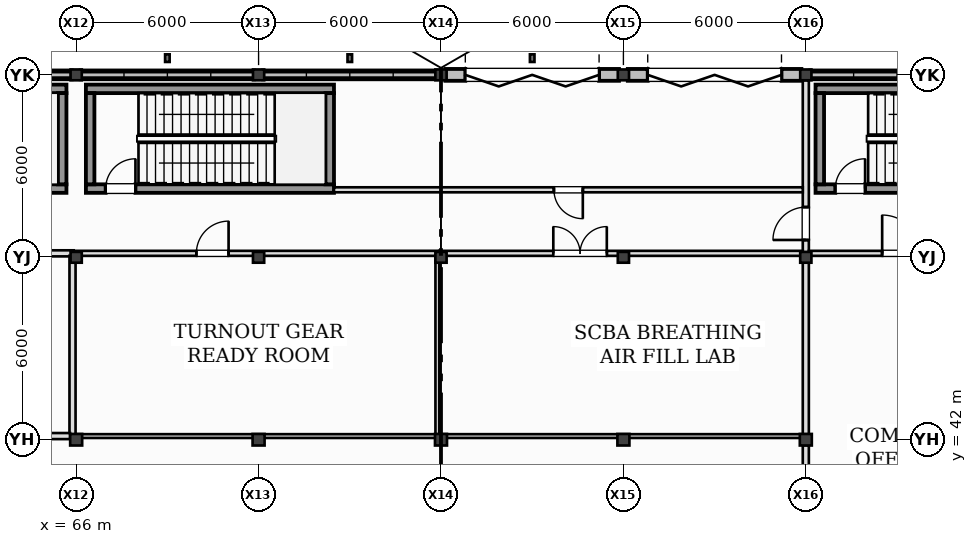
"""IFC4 building model, lengths in metres.
Left out: names, types, materials, properties, quantities, classifications, styles, units other than length and angle.
Written with IfcOpenShell. Run it as: python <this file> out.ifc"""

import sys

from ifc_helpers import new_model, si_unit, direction, frame, frame_2d, origin, origin_2d, place, context, subcontext, project, spatial, rectangle, hollow_rectangle, i_section, extrude, element, fill, save


model = new_model("IFC4")
c1 = context("Model", 3, precision=1e-05, world=origin(), true_north=direction((0.0, 1.0)))
c2 = subcontext(c1, "Body", "Model", "MODEL_VIEW")
j1 = project(units=[si_unit("LENGTHUNIT", "METRE"), si_unit("PLANEANGLEUNIT", "RADIAN")], contexts=[c1])
p1 = place(None, origin())
s1 = spatial("IfcSite", under=j1, at=p1, CompositionType="ELEMENT")
p2 = place(p1, origin())
s2 = spatial("IfcBuilding", under=s1, at=p2, CompositionType="ELEMENT")
p3 = place(p2, origin())
s3 = spatial("IfcBuildingStorey", under=s2, at=p3, CompositionType="ELEMENT", Elevation=0.0)
p4 = place(p3, frame((66.0, 42.0, -0.41), z_axis=(0.0, 0.0, 1.0), x_axis=(1.0, 0.0, 0.0)))
e1 = element("IfcColumn", 1, at=p4, inside=s3, PredefinedType="COLUMN", context=c2, shape_type="SweptSolid", body=[
    extrude(i_section(OverallWidth=0.395, OverallDepth=0.38, WebThickness=0.019, FlangeThickness=0.03, at=origin_2d()), origin(), (0.0, 0.0, 1.0), 6.41),
])
for number, where, z_axis, x_axis in (
    (2, (66.0, 48.0, -0.41), (0.0, 0.0, 1.0), (1.0, 0.0, 0.0)),
    (3, (66.0, 54.0, -0.41), (0.0, 0.0, 1.0), (1.0, 0.0, 0.0)),
):
    element("IfcColumn", number, at=place(p3, frame(where, z_axis=z_axis, x_axis=x_axis)), inside=s3, PredefinedType="COLUMN", context=c2, shape_type="SweptSolid", body=[
        extrude(i_section(OverallWidth=0.369, OverallDepth=0.356, WebThickness=0.011, FlangeThickness=0.018, at=origin_2d()), origin(), (0.0, 0.0, 1.0), 6.41),
    ])
p5 = place(p3, frame((72.0, 42.0, -0.41), z_axis=(0.0, 0.0, 1.0), x_axis=(1.0, 0.0, 0.0)))
e4 = element("IfcColumn", 4, at=p5, inside=s3, PredefinedType="COLUMN", context=c2, shape_type="SweptSolid", body=[
    extrude(i_section(OverallWidth=0.395, OverallDepth=0.38, WebThickness=0.019, FlangeThickness=0.03, at=origin_2d()), origin(), (0.0, 0.0, 1.0), 6.41),
])
for number, where, z_axis, x_axis in (
    (5, (72.0, 48.0, -0.41), (0.0, 0.0, 1.0), (1.0, 0.0, 0.0)),
    (6, (72.0, 54.0, -0.41), (0.0, 0.0, 1.0), (1.0, 0.0, 0.0)),
):
    element("IfcColumn", number, at=place(p3, frame(where, z_axis=z_axis, x_axis=x_axis)), inside=s3, PredefinedType="COLUMN", context=c2, shape_type="SweptSolid", body=[
        extrude(i_section(OverallWidth=0.369, OverallDepth=0.356, WebThickness=0.011, FlangeThickness=0.018, at=origin_2d()), origin(), (0.0, 0.0, 1.0), 6.41),
    ])
p6 = place(p3, frame((78.0, 42.0, -0.41), z_axis=(0.0, 0.0, 1.0), x_axis=(1.0, 0.0, 0.0)))
e7 = element("IfcColumn", 7, at=p6, inside=s3, PredefinedType="COLUMN", context=c2, shape_type="SweptSolid", body=[
    extrude(i_section(OverallWidth=0.395, OverallDepth=0.38, WebThickness=0.019, FlangeThickness=0.03, at=origin_2d()), origin(), (0.0, 0.0, 1.0), 6.41),
])
for number, where, z_axis, x_axis in (
    (8, (78.0, 48.0, -0.41), (0.0, 0.0, 1.0), (1.0, 0.0, 0.0)),
    (9, (78.0, 54.0, -0.41), (0.0, 0.0, 1.0), (1.0, 0.0, 0.0)),
):
    element("IfcColumn", number, at=place(p3, frame(where, z_axis=z_axis, x_axis=x_axis)), inside=s3, PredefinedType="COLUMN", context=c2, shape_type="SweptSolid", body=[
        extrude(i_section(OverallWidth=0.369, OverallDepth=0.356, WebThickness=0.011, FlangeThickness=0.018, at=origin_2d()), origin(), (0.0, 0.0, 1.0), 6.41),
    ])
p7 = place(p3, frame((84.0, 42.0, -0.41), z_axis=(0.0, 0.0, 1.0), x_axis=(1.0, 0.0, 0.0)))
e10 = element("IfcColumn", 10, at=p7, inside=s3, PredefinedType="COLUMN", context=c2, shape_type="SweptSolid", body=[
    extrude(i_section(OverallWidth=0.395, OverallDepth=0.38, WebThickness=0.019, FlangeThickness=0.03, at=origin_2d()), origin(), (0.0, 0.0, 1.0), 6.41),
])
for number, where, z_axis, x_axis in (
    (11, (84.0, 48.0, -0.41), (0.0, 0.0, 1.0), (1.0, 0.0, 0.0)),
    (12, (84.0, 54.0, -0.41), (0.0, 0.0, 1.0), (1.0, 0.0, 0.0)),
):
    element("IfcColumn", number, at=place(p3, frame(where, z_axis=z_axis, x_axis=x_axis)), inside=s3, PredefinedType="COLUMN", context=c2, shape_type="SweptSolid", body=[
        extrude(i_section(OverallWidth=0.369, OverallDepth=0.356, WebThickness=0.011, FlangeThickness=0.018, at=origin_2d()), origin(), (0.0, 0.0, 1.0), 6.41),
    ])
p8 = place(p3, frame((90.0, 42.0, -0.41), z_axis=(0.0, 0.0, 1.0), x_axis=(1.0, 0.0, 0.0)))
e13 = element("IfcColumn", 13, at=p8, inside=s3, PredefinedType="COLUMN", context=c2, shape_type="SweptSolid", body=[
    extrude(i_section(OverallWidth=0.395, OverallDepth=0.38, WebThickness=0.019, FlangeThickness=0.03, at=origin_2d()), origin(), (0.0, 0.0, 1.0), 6.41),
])
for number, where, z_axis, x_axis in (
    (14, (90.0, 48.0, -0.41), (0.0, 0.0, 1.0), (1.0, 0.0, 0.0)),
    (15, (90.0, 54.0, -0.41), (0.0, 0.0, 1.0), (1.0, 0.0, 0.0)),
):
    element("IfcColumn", number, at=place(p3, frame(where, z_axis=z_axis, x_axis=x_axis)), inside=s3, PredefinedType="COLUMN", context=c2, shape_type="SweptSolid", body=[
        extrude(i_section(OverallWidth=0.369, OverallDepth=0.356, WebThickness=0.011, FlangeThickness=0.018, at=origin_2d()), origin(), (0.0, 0.0, 1.0), 6.41),
    ])
for number, where, z_axis, x_axis in (
    (16, (69.0, 54.55, -0.35), (0.0, 0.0, 1.0), (1.0, 0.0, 0.0)),
    (17, (75.0, 54.55, -0.35), (0.0, 0.0, 1.0), (1.0, 0.0, 0.0)),
    (18, (81.0, 54.55, -0.35), (0.0, 0.0, 1.0), (1.0, 0.0, 0.0)),
):
    element("IfcColumn", number, at=place(p3, frame(where, z_axis=z_axis, x_axis=x_axis)), inside=s3, PredefinedType="PILASTER", context=c2, shape_type="SweptSolid", body=[
        extrude(hollow_rectangle(XDim=0.15, YDim=0.25, WallThickness=0.008, at=origin_2d()), origin(), (0.0, 0.0, 1.0), 6.35),
    ])
p9 = place(p3, frame((65.855, 54.0, 0.0), z_axis=(0.0, 0.0, 1.0), x_axis=(-1.0, 0.0, 0.0)))
e19 = element("IfcWall", 19, at=p9, inside=s3, PredefinedType="STANDARD", context=c2, shape_type="SweptSolid", body=[
    extrude(rectangle(XDim=5.71, YDim=0.29, at=frame_2d((2.855, 0.0))), origin(), (0.0, 0.0, 1.0), 0.92),
])
p10 = place(p3, frame((71.855, 54.0, 0.0), z_axis=(0.0, 0.0, 1.0), x_axis=(-1.0, 0.0, 0.0)))
e20 = element("IfcWall", 20, at=p10, inside=s3, PredefinedType="STANDARD", context=c2, shape_type="SweptSolid", body=[
    extrude(rectangle(XDim=5.71, YDim=0.29, at=frame_2d((2.855, 0.0))), origin(), (0.0, 0.0, 1.0), 0.32),
])
p11 = place(p3, frame((77.855, 54.0, 0.0), z_axis=(0.0, 0.0, 1.0), x_axis=(-1.0, 0.0, 0.0)))
e21 = element("IfcWall", 21, at=p11, inside=s3, PredefinedType="STANDARD", context=c2, shape_type="SweptSolid", body=[
    extrude(rectangle(XDim=5.71, YDim=0.29, at=frame_2d((2.855, 0.0))), origin(), (0.0, 0.0, 1.0), 0.44),
])
p12 = place(p3, frame((83.855, 54.0, 0.0), z_axis=(0.0, 0.0, 1.0), x_axis=(-1.0, 0.0, 0.0)))
e22 = element("IfcWall", 22, at=p12, inside=s3, PredefinedType="STANDARD", context=c2, shape_type="SweptSolid", body=[
    extrude(rectangle(XDim=5.71, YDim=0.39, at=frame_2d((2.855, 0.0))), origin(), (0.0, 0.0, 1.0), 5.035),
])
p13 = place(p12, frame((0.655, 0.0, 0.0)))
e23 = element("IfcOpeningElement", 23, at=p13, cuts=e22, PredefinedType="OPENING", context=c2, shape_type="SweptSolid", body=[
    extrude(rectangle(XDim=4.4, YDim=4.55, at=frame_2d((2.2, 2.275))), frame((0.0, 0.205, 0.0), z_axis=(0.0, -1.0, 0.0), x_axis=(1.0, 0.0, 0.0)), (0.0, 0.0, 1.0), 0.41),
])
p14 = place(p3, frame((89.855, 54.0, 0.0), z_axis=(0.0, 0.0, 1.0), x_axis=(-1.0, 0.0, 0.0)))
e24 = element("IfcWall", 24, at=p14, inside=s3, PredefinedType="STANDARD", context=c2, shape_type="SweptSolid", body=[
    extrude(rectangle(XDim=5.71, YDim=0.39, at=frame_2d((2.855, 0.0))), origin(), (0.0, 0.0, 1.0), 5.035),
])
p15 = place(p14, frame((0.655, 0.0, 0.0)))
e25 = element("IfcOpeningElement", 25, at=p15, cuts=e24, PredefinedType="OPENING", context=c2, shape_type="SweptSolid", body=[
    extrude(rectangle(XDim=4.4, YDim=4.55, at=frame_2d((2.2, 2.275))), frame((0.0, 0.205, 0.0), z_axis=(0.0, -1.0, 0.0), x_axis=(1.0, 0.0, 0.0)), (0.0, 0.0, 1.0), 0.41),
])
p16 = place(p3, frame((95.855, 54.0, 0.0), z_axis=(0.0, 0.0, 1.0), x_axis=(-1.0, 0.0, 0.0)))
e26 = element("IfcWall", 26, at=p16, inside=s3, PredefinedType="STANDARD", context=c2, shape_type="SweptSolid", body=[
    extrude(rectangle(XDim=5.71, YDim=0.29, at=frame_2d((2.855, 0.0))), origin(), (0.0, 0.0, 1.0), 0.92),
])
p17 = place(p3, frame((57.52, 50.26, 0.0), z_axis=(0.0, 0.0, 1.0), x_axis=(1.0, 0.0, 0.0)))
e27 = element("IfcWall", 27, at=p17, inside=s3, PredefinedType="SHEAR", context=c2, shape_type="SweptSolid", body=[
    extrude(rectangle(XDim=8.16, YDim=0.28, at=frame_2d((4.08, 0.0))), origin(), (0.0, 0.0, 1.0), 6.0),
])
p18 = place(p17, frame((0.65, 0.0, 0.0)))
e28 = element("IfcOpeningElement", 28, at=p18, cuts=e27, PredefinedType="OPENING", context=c2, shape_type="SweptSolid", body=[
    extrude(rectangle(XDim=0.98, YDim=2.15, at=frame_2d((0.49, 1.075))), frame((0.0, 0.15, 0.0), z_axis=(0.0, -1.0, 0.0), x_axis=(1.0, 0.0, 0.0)), (0.0, 0.0, 1.0), 0.3),
])
p19 = place(p3, frame((65.68, 53.54, 0.0), z_axis=(0.0, 0.0, 1.0), x_axis=(-1.0, 0.0, 0.0)))
e29 = element("IfcWall", 29, at=p19, inside=s3, PredefinedType="SHEAR", context=c2, shape_type="SweptSolid", body=[
    extrude(rectangle(XDim=8.16, YDim=0.28, at=frame_2d((4.08, 0.0))), origin(), (0.0, 0.0, 1.0), 6.0),
])
p20 = place(p3, frame((65.54, 50.4, 0.0), z_axis=(0.0, 0.0, 1.0), x_axis=(0.0, 1.0, 0.0)))
e30 = element("IfcWall", 30, at=p20, inside=s3, PredefinedType="SHEAR", context=c2, shape_type="SweptSolid", body=[
    extrude(rectangle(XDim=3.0, YDim=0.28, at=frame_2d((1.5, 0.0))), origin(), (0.0, 0.0, 1.0), 6.0),
])
p21 = place(p3, frame((90.32, 50.26, 0.0), z_axis=(0.0, 0.0, 1.0), x_axis=(1.0, 0.0, 0.0)))
e31 = element("IfcWall", 31, at=p21, inside=s3, PredefinedType="SHEAR", context=c2, shape_type="SweptSolid", body=[
    extrude(rectangle(XDim=8.16, YDim=0.28, at=frame_2d((4.08, 0.0))), origin(), (0.0, 0.0, 1.0), 6.0),
])
p22 = place(p21, frame((0.65, 0.0, 0.0)))
e32 = element("IfcOpeningElement", 32, at=p22, cuts=e31, PredefinedType="OPENING", context=c2, shape_type="SweptSolid", body=[
    extrude(rectangle(XDim=0.98, YDim=2.15, at=frame_2d((0.49, 1.075))), frame((0.0, 0.15, 0.0), z_axis=(0.0, -1.0, 0.0), x_axis=(1.0, 0.0, 0.0)), (0.0, 0.0, 1.0), 0.3),
])
p23 = place(p3, frame((98.48, 53.54, 0.0), z_axis=(0.0, 0.0, 1.0), x_axis=(-1.0, 0.0, 0.0)))
e33 = element("IfcWall", 33, at=p23, inside=s3, PredefinedType="SHEAR", context=c2, shape_type="SweptSolid", body=[
    extrude(rectangle(XDim=8.16, YDim=0.28, at=frame_2d((4.08, 0.0))), origin(), (0.0, 0.0, 1.0), 6.0),
])
p24 = place(p3, frame((90.46, 53.4, 0.0), z_axis=(0.0, 0.0, 1.0), x_axis=(0.0, -1.0, 0.0)))
e34 = element("IfcWall", 34, at=p24, inside=s3, PredefinedType="SHEAR", context=c2, shape_type="SweptSolid", body=[
    extrude(rectangle(XDim=3.0, YDim=0.28, at=frame_2d((1.5, 0.0))), origin(), (0.0, 0.0, 1.0), 6.0),
])
p25 = place(p3, frame((66.32, 50.26, 0.0), z_axis=(0.0, 0.0, 1.0), x_axis=(1.0, 0.0, 0.0)))
e35 = element("IfcWall", 35, at=p25, inside=s3, PredefinedType="SHEAR", context=c2, shape_type="SweptSolid", body=[
    extrude(rectangle(XDim=8.16, YDim=0.28, at=frame_2d((4.08, 0.0))), origin(), (0.0, 0.0, 1.0), 6.0),
])
p26 = place(p25, frame((0.65, 0.0, 0.0)))
e36 = element("IfcOpeningElement", 36, at=p26, cuts=e35, PredefinedType="OPENING", context=c2, shape_type="SweptSolid", body=[
    extrude(rectangle(XDim=0.98, YDim=2.15, at=frame_2d((0.49, 1.075))), frame((0.0, 0.15, 0.0), z_axis=(0.0, -1.0, 0.0), x_axis=(1.0, 0.0, 0.0)), (0.0, 0.0, 1.0), 0.3),
])
p27 = place(p3, frame((74.48, 53.54, 0.0), z_axis=(0.0, 0.0, 1.0), x_axis=(-1.0, 0.0, 0.0)))
e37 = element("IfcWall", 37, at=p27, inside=s3, PredefinedType="SHEAR", context=c2, shape_type="SweptSolid", body=[
    extrude(rectangle(XDim=8.16, YDim=0.28, at=frame_2d((4.08, 0.0))), origin(), (0.0, 0.0, 1.0), 6.0),
])
for number, where, z_axis, x_axis in (
    (38, (66.46, 53.4, 0.0), (0.0, 0.0, 1.0), (0.0, -1.0, 0.0)),
    (39, (74.34, 50.4, 0.0), (0.0, 0.0, 1.0), (0.0, 1.0, 0.0)),
):
    element("IfcWall", number, at=place(p3, frame(where, z_axis=z_axis, x_axis=x_axis)), inside=s3, PredefinedType="SHEAR", context=c2, shape_type="SweptSolid", body=[
        extrude(rectangle(XDim=3.0, YDim=0.28, at=frame_2d((1.5, 0.0))), origin(), (0.0, 0.0, 1.0), 6.0),
    ])
p28 = place(p3, frame((90.0, 36.18, 0.0), z_axis=(0.0, 0.0, 1.0), x_axis=(0.0, 1.0, 0.0)))
e40 = element("IfcWall", 40, at=p28, inside=s3, PredefinedType="PARTITIONING", context=c2, shape_type="SweptSolid", body=[
    extrude(rectangle(XDim=5.64, YDim=0.2, at=frame_2d((2.82, 0.0))), origin(), (0.0, 0.0, 1.0), 4.959),
])
p29 = place(p3, frame((90.0, 42.18, 0.0), z_axis=(0.0, 0.0, 1.0), x_axis=(0.0, 1.0, 0.0)))
e41 = element("IfcWall", 41, at=p29, inside=s3, PredefinedType="PARTITIONING", context=c2, shape_type="SweptSolid", body=[
    extrude(rectangle(XDim=5.72, YDim=0.2, at=frame_2d((2.86, 0.0))), origin(), (0.0, 0.0, 1.0), 5.044),
])
p30 = place(p3, frame((90.0, 48.05, 0.0), z_axis=(0.0, 0.0, 1.0), x_axis=(0.0, 1.0, 0.0)))
e42 = element("IfcWall", 42, at=p30, inside=s3, PredefinedType="PARTITIONING", context=c2, shape_type="SweptSolid", body=[
    extrude(rectangle(XDim=5.77, YDim=0.2, at=frame_2d((2.885, 0.0))), origin(), (0.0, 0.0, 1.0), 5.044),
])
p31 = place(p30, frame((0.52, 0.0, 0.0)))
e43 = element("IfcOpeningElement", 43, at=p31, cuts=e42, PredefinedType="OPENING", context=c2, shape_type="SweptSolid", body=[
    extrude(rectangle(XDim=1.08, YDim=2.14, at=frame_2d((0.54, 1.07))), frame((0.0, 0.11, 0.0), z_axis=(0.0, -1.0, 0.0), x_axis=(1.0, 0.0, 0.0)), (0.0, 0.0, 1.0), 0.22),
])
p32 = place(p3, frame((53.98, 48.13, 0.0), z_axis=(0.0, 0.0, 1.0), x_axis=(1.0, 0.0, 0.0)))
e44 = element("IfcWall", 44, at=p32, inside=s3, PredefinedType="PARTITIONING", context=c2, shape_type="SweptSolid", body=[
    extrude(rectangle(XDim=11.94, YDim=0.2, at=frame_2d((5.97, 0.0))), origin(), (0.0, 0.0, 1.0), 5.035),
])
p33 = place(p32, frame((3.915, 0.0, 0.0)))
e45 = element("IfcOpeningElement", 45, at=p33, cuts=e44, PredefinedType="OPENING", context=c2, shape_type="SweptSolid", body=[
    extrude(rectangle(XDim=1.46, YDim=2.3, at=frame_2d((0.73, 1.15))), frame((0.0, 0.11, 0.0), z_axis=(0.0, -1.0, 0.0), x_axis=(1.0, 0.0, 0.0)), (0.0, 0.0, 1.0), 0.22),
])
p34 = place(p3, frame((65.88, 48.05, 0.0), z_axis=(0.0, 0.0, 1.0), x_axis=(0.0, -1.0, 0.0)))
e46 = element("IfcWall", 46, at=p34, inside=s3, PredefinedType="PARTITIONING", context=c2, shape_type="SweptSolid", body=[
    extrude(rectangle(XDim=5.97, YDim=0.2, at=frame_2d((2.985, 0.0))), origin(), (0.0, 0.0, 1.0), 5.044),
])
p35 = place(p3, frame((65.8, 42.12, 0.0), z_axis=(0.0, 0.0, 1.0), x_axis=(-1.0, 0.0, 0.0)))
e47 = element("IfcWall", 47, at=p35, inside=s3, PredefinedType="PARTITIONING", context=c2, shape_type="SweptSolid", body=[
    extrude(rectangle(XDim=11.82, YDim=0.2, at=frame_2d((5.91, 0.0))), origin(), (0.0, 0.0, 1.0), 5.035),
])
p36 = place(p3, frame((65.98, 48.13, 0.0), z_axis=(0.0, 0.0, 1.0), x_axis=(1.0, 0.0, 0.0)))
e48 = element("IfcWall", 48, at=p36, inside=s3, PredefinedType="PARTITIONING", context=c2, shape_type="SweptSolid", body=[
    extrude(rectangle(XDim=11.923, YDim=0.165, at=frame_2d((5.961, 0.0))), origin(), (0.0, 0.0, 1.0), 5.035),
])
p37 = place(p36, frame((3.973, 0.0, 0.0)))
e49 = element("IfcOpeningElement", 49, at=p37, cuts=e48, PredefinedType="OPENING", context=c2, shape_type="SweptSolid", body=[
    extrude(rectangle(XDim=1.06, YDim=2.25, at=frame_2d((0.53, 1.125))), frame((0.0, 0.093, 0.0), z_axis=(0.0, -1.0, 0.0), x_axis=(1.0, 0.0, 0.0)), (0.0, 0.0, 1.0), 0.185),
])
p38 = place(p3, frame((77.88, 48.05, 0.0), z_axis=(0.0, 0.0, 1.0), x_axis=(0.0, -1.0, 0.0)))
e50 = element("IfcWall", 50, at=p38, inside=s3, PredefinedType="PARTITIONING", context=c2, shape_type="SweptSolid", body=[
    extrude(rectangle(XDim=5.933, YDim=0.125, at=frame_2d((2.966, 0.0))), origin(), (0.0, 0.0, 1.0), 5.044),
])
p39 = place(p3, frame((77.817, 42.12, 0.0), z_axis=(0.0, 0.0, 1.0), x_axis=(-1.0, 0.0, 0.0)))
e51 = element("IfcWall", 51, at=p39, inside=s3, PredefinedType="PARTITIONING", context=c2, shape_type="SweptSolid", body=[
    extrude(rectangle(XDim=11.837, YDim=0.125, at=frame_2d((5.919, 0.0))), origin(), (0.0, 0.0, 1.0), 5.035),
])
p40 = place(p3, frame((77.942, 48.13, 0.0), z_axis=(0.0, 0.0, 1.0), x_axis=(1.0, 0.0, 0.0)))
e52 = element("IfcWall", 52, at=p40, inside=s3, PredefinedType="PARTITIONING", context=c2, shape_type="SweptSolid", body=[
    extrude(rectangle(XDim=11.958, YDim=0.165, at=frame_2d((5.979, 0.0))), origin(), (0.0, 0.0, 1.0), 5.035),
])
p41 = place(p40, frame((3.752, 0.0, 0.0)))
e53 = element("IfcOpeningElement", 53, at=p41, cuts=e52, PredefinedType="OPENING", context=c2, shape_type="SweptSolid", body=[
    extrude(rectangle(XDim=1.76, YDim=2.26, at=frame_2d((0.88, 1.13))), frame((0.0, 0.093, 0.0), z_axis=(0.0, -1.0, 0.0), x_axis=(1.0, 0.0, 0.0)), (0.0, 0.0, 1.0), 0.185),
])
p42 = place(p3, frame((89.9, 42.12, 0.0), z_axis=(0.0, 0.0, 1.0), x_axis=(-1.0, 0.0, 0.0)))
e54 = element("IfcWall", 54, at=p42, inside=s3, PredefinedType="PARTITIONING", context=c2, shape_type="SweptSolid", body=[
    extrude(rectangle(XDim=11.958, YDim=0.125, at=frame_2d((5.979, 0.0))), origin(), (0.0, 0.0, 1.0), 5.035),
])
p43 = place(p3, frame((89.9, 50.22, 0.0), z_axis=(0.0, 0.0, 1.0), x_axis=(-1.0, 0.0, 0.0)))
e55 = element("IfcWall", 55, at=p43, inside=s3, PredefinedType="PARTITIONING", context=c2, shape_type="SweptSolid", body=[
    extrude(rectangle(XDim=15.42, YDim=0.165, at=frame_2d((7.71, 0.0))), origin(), (0.0, 0.0, 1.0), 5.68),
])
p44 = place(p43, frame((7.235, 0.0, 0.0)))
e56 = element("IfcOpeningElement", 56, at=p44, cuts=e55, PredefinedType="OPENING", context=c2, shape_type="SweptSolid", body=[
    extrude(rectangle(XDim=0.95, YDim=2.12, at=frame_2d((0.475, 1.06))), frame((0.0, 0.093, 0.0), z_axis=(0.0, -1.0, 0.0), x_axis=(1.0, 0.0, 0.0)), (0.0, 0.0, 1.0), 0.185),
])
p45 = place(p3, frame((90.1, 48.13, 0.0), z_axis=(0.0, 0.0, 1.0), x_axis=(1.0, 0.0, 0.0)))
e57 = element("IfcWall", 57, at=p45, inside=s3, PredefinedType="PARTITIONING", context=c2, shape_type="SweptSolid", body=[
    extrude(rectangle(XDim=6.083, YDim=0.165, at=frame_2d((3.041, 0.0))), origin(), (0.0, 0.0, 1.0), 5.035),
])
p46 = place(p45, frame((2.411, 0.0, 0.0)))
e58 = element("IfcOpeningElement", 58, at=p46, cuts=e57, PredefinedType="OPENING", context=c2, shape_type="SweptSolid", body=[
    extrude(rectangle(XDim=1.26, YDim=2.2, at=frame_2d((0.63, 1.1))), frame((0.0, 0.093, 0.0), z_axis=(0.0, -1.0, 0.0), x_axis=(1.0, 0.0, 0.0)), (0.0, 0.0, 1.0), 0.185),
])
p47 = place(p13, frame((4.4, 0.0, 0.0), z_axis=(0.0, 0.0, 1.0), x_axis=(-1.0, 0.0, 0.0)))
e59 = element("IfcDoor", 59, at=p47, inside=s3, OperationType="FOLDING_TO_LEFT", PredefinedType="DOOR", context=c2, shape_type="SweptSolid", body=[
    extrude(rectangle(XDim=4.4, YDim=4.55, at=frame_2d((2.2, 2.275))), frame((0.0, 0.025, 0.0), z_axis=(0.0, -1.0, 0.0), x_axis=(1.0, 0.0, 0.0)), (0.0, 0.0, 1.0), 0.05),
])
fill(e23, e59)
p48 = place(p15, frame((4.4, 0.0, 0.0), z_axis=(0.0, 0.0, 1.0), x_axis=(-1.0, 0.0, 0.0)))
e60 = element("IfcDoor", 60, at=p48, inside=s3, OperationType="FOLDING_TO_LEFT", PredefinedType="DOOR", context=c2, shape_type="SweptSolid", body=[
    extrude(rectangle(XDim=4.4, YDim=4.55, at=frame_2d((2.2, 2.275))), frame((0.0, 0.025, 0.0), z_axis=(0.0, -1.0, 0.0), x_axis=(1.0, 0.0, 0.0)), (0.0, 0.0, 1.0), 0.05),
])
fill(e25, e60)
p49 = place(p22, origin())
e61 = element("IfcDoor", 61, at=p49, inside=s3, OperationType="SINGLE_SWING_RIGHT", PredefinedType="DOOR", context=c2, shape_type="SweptSolid", body=[
    extrude(rectangle(XDim=0.98, YDim=2.15, at=frame_2d((0.49, 1.075))), frame((0.0, 0.025, 0.0), z_axis=(0.0, -1.0, 0.0), x_axis=(1.0, 0.0, 0.0)), (0.0, 0.0, 1.0), 0.05),
])
fill(e32, e61)
p50 = place(p26, origin())
e62 = element("IfcDoor", 62, at=p50, inside=s3, OperationType="SINGLE_SWING_RIGHT", PredefinedType="DOOR", context=c2, shape_type="SweptSolid", body=[
    extrude(rectangle(XDim=0.98, YDim=2.15, at=frame_2d((0.49, 1.075))), frame((0.0, 0.025, 0.0), z_axis=(0.0, -1.0, 0.0), x_axis=(1.0, 0.0, 0.0)), (0.0, 0.0, 1.0), 0.05),
])
fill(e36, e62)
p51 = place(p31, frame((1.08, 0.0, 0.0), z_axis=(0.0, 0.0, 1.0), x_axis=(-1.0, 0.0, 0.0)))
e63 = element("IfcDoor", 63, at=p51, inside=s3, OperationType="SINGLE_SWING_LEFT", PredefinedType="DOOR", context=c2, shape_type="SweptSolid", body=[
    extrude(rectangle(XDim=1.08, YDim=2.14, at=frame_2d((0.54, 1.07))), frame((0.0, 0.025, 0.0), z_axis=(0.0, -1.0, 0.0), x_axis=(1.0, 0.0, 0.0)), (0.0, 0.0, 1.0), 0.05),
])
fill(e43, e63)
p52 = place(p37, frame((1.06, 0.0, 0.0), z_axis=(0.0, 0.0, 1.0), x_axis=(-1.0, 0.0, 0.0)))
e64 = element("IfcDoor", 64, at=p52, inside=s3, OperationType="SINGLE_SWING_RIGHT", PredefinedType="DOOR", context=c2, shape_type="SweptSolid", body=[
    extrude(rectangle(XDim=1.06, YDim=2.25, at=frame_2d((0.53, 1.125))), frame((0.0, 0.025, 0.0), z_axis=(0.0, -1.0, 0.0), x_axis=(1.0, 0.0, 0.0)), (0.0, 0.0, 1.0), 0.05),
])
fill(e49, e64)
p53 = place(p41, frame((1.76, 0.0, 0.0), z_axis=(0.0, 0.0, 1.0), x_axis=(-1.0, 0.0, 0.0)))
e65 = element("IfcDoor", 65, at=p53, inside=s3, OperationType="DOUBLE_DOOR_SINGLE_SWING", PredefinedType="DOOR", context=c2, shape_type="SweptSolid", body=[
    extrude(rectangle(XDim=1.76, YDim=2.26, at=frame_2d((0.88, 1.13))), frame((0.0, 0.025, 0.0), z_axis=(0.0, -1.0, 0.0), x_axis=(1.0, 0.0, 0.0)), (0.0, 0.0, 1.0), 0.05),
])
fill(e53, e65)
p54 = place(p44, frame((0.95, 0.0, 0.0), z_axis=(0.0, 0.0, 1.0), x_axis=(-1.0, 0.0, 0.0)))
e66 = element("IfcDoor", 66, at=p54, inside=s3, OperationType="SINGLE_SWING_LEFT", PredefinedType="DOOR", context=c2, shape_type="SweptSolid", body=[
    extrude(rectangle(XDim=0.95, YDim=2.12, at=frame_2d((0.475, 1.06))), frame((0.0, 0.025, 0.0), z_axis=(0.0, -1.0, 0.0), x_axis=(1.0, 0.0, 0.0)), (0.0, 0.0, 1.0), 0.05),
])
fill(e56, e66)
p55 = place(p46, frame((1.26, 0.0, 0.0), z_axis=(0.0, 0.0, 1.0), x_axis=(-1.0, 0.0, 0.0)))
e67 = element("IfcDoor", 67, at=p55, inside=s3, OperationType="SINGLE_SWING_LEFT", PredefinedType="DOOR", context=c2, shape_type="SweptSolid", body=[
    extrude(rectangle(XDim=1.26, YDim=2.2, at=frame_2d((0.63, 1.1))), frame((0.0, 0.025, 0.0), z_axis=(0.0, -1.0, 0.0), x_axis=(1.0, 0.0, 0.0)), (0.0, 0.0, 1.0), 0.05),
])
fill(e58, e67)
save(model, sys.argv[1])
